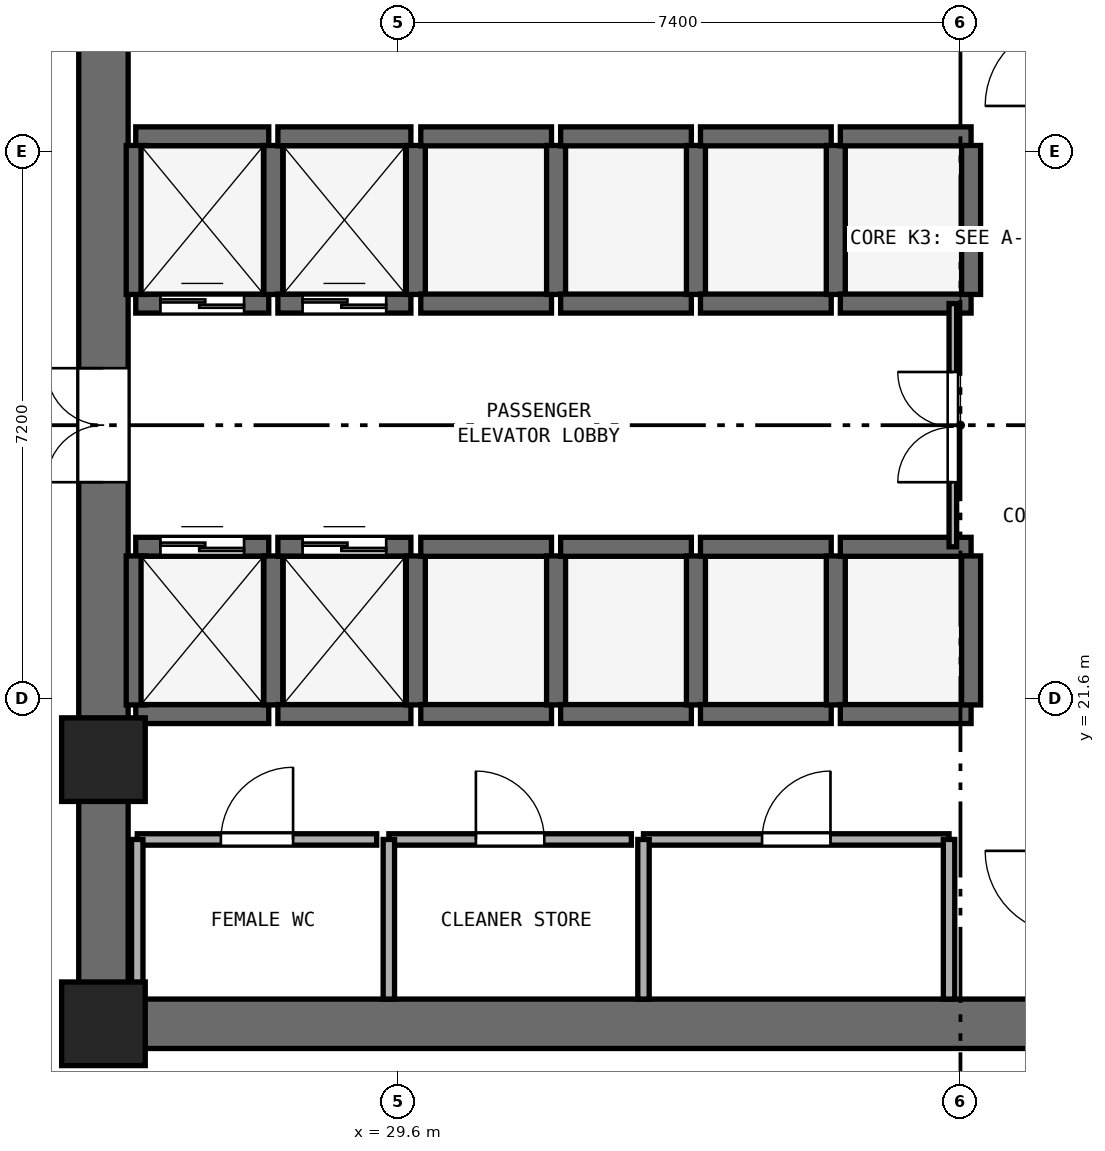
"""IFC4 building model, lengths in metres.
Left out: names, types, materials, properties, quantities, classifications, styles, units other than length and angle.
Written with IfcOpenShell. Run it as: python <this file> out.ifc"""

import sys

from ifc_helpers import new_model, si_unit, direction, frame, frame_2d, origin, origin_2d, place, context, subcontext, project, spatial, rectangle, extrude, element, fill, save


model = new_model("IFC4")
c1 = context("Model", 3, precision=1e-05, world=origin(), true_north=direction((0.0, 1.0)))
c2 = subcontext(c1, "Body", "Model", "MODEL_VIEW")
j1 = project(units=[si_unit("LENGTHUNIT", "METRE"), si_unit("PLANEANGLEUNIT", "RADIAN")], contexts=[c1])
p1 = place(None, origin())
s1 = spatial("IfcSite", under=j1, at=p1, CompositionType="ELEMENT")
p2 = place(p1, origin())
s2 = spatial("IfcBuilding", under=s1, at=p2, CompositionType="ELEMENT")
p3 = place(p2, frame((0.0, 0.0, 101.0)))
s3 = spatial("IfcBuildingStorey", under=s2, at=p3, CompositionType="ELEMENT", Elevation=101.0)
p4 = place(p3, frame((25.4, 17.325, 0.0), z_axis=(0.0, 0.0, 1.0), x_axis=(1.0, 0.0, 0.0)))
e1 = element("IfcWall", 1, at=p4, inside=s3, PredefinedType="SHEAR", context=c2, shape_type="SweptSolid", body=[
    extrude(rectangle(XDim=23.2, YDim=0.65, at=frame_2d((11.6, 0.0))), origin(), (0.0, 0.0, 1.0), 3.525),
])
p5 = place(p3, frame((25.725, 17.65, 0.0), z_axis=(0.0, 0.0, 1.0), x_axis=(0.0, 1.0, 0.0)))
e2 = element("IfcWall", 2, at=p5, inside=s3, PredefinedType="SHEAR", context=c2, shape_type="SweptSolid", body=[
    extrude(rectangle(XDim=15.1, YDim=0.65, at=frame_2d((7.55, 0.0))), origin(), (0.0, 0.0, 1.0), 3.525),
])
p6 = place(p5, frame((6.8, 0.0, 0.0)))
e3 = element("IfcOpeningElement", 3, at=p6, cuts=e2, PredefinedType="OPENING", context=c2, shape_type="SweptSolid", body=[
    extrude(rectangle(XDim=1.5, YDim=2.15, at=frame_2d((0.75, 1.075))), frame((0.0, 0.335, 0.0), z_axis=(0.0, -1.0, 0.0), x_axis=(1.0, 0.0, 0.0)), (0.0, 0.0, 1.0), 0.67),
])
for number, where, z_axis, x_axis in (
    (4, (25.725, 17.325, 0.0), (0.0, 0.0, 1.0), (1.0, 0.0, 0.0)),
    (5, (25.725, 20.8, 0.0), (0.0, 0.0, 1.0), (1.0, 0.0, 0.0)),
):
    element("IfcColumn", number, at=place(p3, frame(where, z_axis=z_axis, x_axis=x_axis)), inside=s3, PredefinedType="PILASTER", context=c2, shape_type="SweptSolid", body=[
        extrude(rectangle(XDim=1.1, YDim=1.1, at=origin_2d()), origin(), (0.0, 0.0, 1.0), 3.8),
    ])
p7 = place(p3, frame((26.15, 26.8, 0.0), z_axis=(0.0, 0.0, 1.0), x_axis=(1.0, 0.0, 0.0)))
e6 = element("IfcWall", 6, at=p7, inside=s3, PredefinedType="SHEAR", context=c2, shape_type="SweptSolid", body=[
    extrude(rectangle(XDim=1.75, YDim=0.25, at=frame_2d((0.875, 0.0))), origin(), (0.0, 0.0, 1.0), 3.525),
])
p8 = place(p7, frame((0.325, 0.0, 0.0)))
e7 = element("IfcOpeningElement", 7, at=p8, cuts=e6, PredefinedType="OPENING", context=c2, shape_type="SweptSolid", body=[
    extrude(rectangle(XDim=1.1, YDim=2.15, at=frame_2d((0.55, 1.075))), frame((0.0, 0.135, 0.0), z_axis=(0.0, -1.0, 0.0), x_axis=(1.0, 0.0, 0.0)), (0.0, 0.0, 1.0), 0.27),
])
p9 = place(p3, frame((26.15, 29.0, 0.0), z_axis=(0.0, 0.0, 1.0), x_axis=(1.0, 0.0, 0.0)))
e8 = element("IfcWall", 8, at=p9, inside=s3, PredefinedType="SHEAR", context=c2, shape_type="SweptSolid", body=[
    extrude(rectangle(XDim=1.75, YDim=0.25, at=frame_2d((0.875, 0.0))), origin(), (0.0, 0.0, 1.0), 3.525),
])
for number, where, z_axis, x_axis in (
    (9, (26.15, 26.92, 0.0), (0.0, 0.0, 1.0), (0.0, 1.0, 0.0)),
    (10, (27.96, 26.92, 0.0), (0.0, 0.0, 1.0), (0.0, 1.0, 0.0)),
):
    element("IfcWall", number, at=place(p3, frame(where, z_axis=z_axis, x_axis=x_axis)), inside=s3, PredefinedType="SHEAR", context=c2, shape_type="SweptSolid", body=[
        extrude(rectangle(XDim=1.96, YDim=0.25, at=frame_2d((0.98, 0.0))), origin(), (0.0, 0.0, 1.0), 3.525),
    ])
p10 = place(p3, frame((28.02, 26.8, 0.0), z_axis=(0.0, 0.0, 1.0), x_axis=(1.0, 0.0, 0.0)))
e11 = element("IfcWall", 11, at=p10, inside=s3, PredefinedType="SHEAR", context=c2, shape_type="SweptSolid", body=[
    extrude(rectangle(XDim=1.75, YDim=0.25, at=frame_2d((0.875, 0.0))), origin(), (0.0, 0.0, 1.0), 3.525),
])
p11 = place(p10, frame((0.325, 0.0, 0.0)))
e12 = element("IfcOpeningElement", 12, at=p11, cuts=e11, PredefinedType="OPENING", context=c2, shape_type="SweptSolid", body=[
    extrude(rectangle(XDim=1.1, YDim=2.15, at=frame_2d((0.55, 1.075))), frame((0.0, 0.135, 0.0), z_axis=(0.0, -1.0, 0.0), x_axis=(1.0, 0.0, 0.0)), (0.0, 0.0, 1.0), 0.27),
])
p12 = place(p3, frame((28.02, 29.0, 0.0), z_axis=(0.0, 0.0, 1.0), x_axis=(1.0, 0.0, 0.0)))
e13 = element("IfcWall", 13, at=p12, inside=s3, PredefinedType="SHEAR", context=c2, shape_type="SweptSolid", body=[
    extrude(rectangle(XDim=1.75, YDim=0.25, at=frame_2d((0.875, 0.0))), origin(), (0.0, 0.0, 1.0), 3.525),
])
p13 = place(p3, frame((29.835, 26.92, 0.0), z_axis=(0.0, 0.0, 1.0), x_axis=(0.0, 1.0, 0.0)))
e14 = element("IfcWall", 14, at=p13, inside=s3, PredefinedType="SHEAR", context=c2, shape_type="SweptSolid", body=[
    extrude(rectangle(XDim=1.96, YDim=0.25, at=frame_2d((0.98, 0.0))), origin(), (0.0, 0.0, 1.0), 3.525),
])
p14 = place(p3, frame((26.15, 21.4, 0.0), z_axis=(0.0, 0.0, 1.0), x_axis=(1.0, 0.0, 0.0)))
e15 = element("IfcWall", 15, at=p14, inside=s3, PredefinedType="SHEAR", context=c2, shape_type="SweptSolid", body=[
    extrude(rectangle(XDim=1.75, YDim=0.25, at=frame_2d((0.875, 0.0))), origin(), (0.0, 0.0, 1.0), 3.525),
])
p15 = place(p3, frame((26.15, 23.6, 0.0), z_axis=(0.0, 0.0, 1.0), x_axis=(1.0, 0.0, 0.0)))
e16 = element("IfcWall", 16, at=p15, inside=s3, PredefinedType="SHEAR", context=c2, shape_type="SweptSolid", body=[
    extrude(rectangle(XDim=1.75, YDim=0.25, at=frame_2d((0.875, 0.0))), origin(), (0.0, 0.0, 1.0), 3.525),
])
p16 = place(p15, frame((0.325, 0.0, 0.0)))
e17 = element("IfcOpeningElement", 17, at=p16, cuts=e16, PredefinedType="OPENING", context=c2, shape_type="SweptSolid", body=[
    extrude(rectangle(XDim=1.1, YDim=2.15, at=frame_2d((0.55, 1.075))), frame((0.0, 0.135, 0.0), z_axis=(0.0, -1.0, 0.0), x_axis=(1.0, 0.0, 0.0)), (0.0, 0.0, 1.0), 0.27),
])
for number, where, z_axis, x_axis in (
    (18, (26.15, 21.52, 0.0), (0.0, 0.0, 1.0), (0.0, 1.0, 0.0)),
    (19, (27.96, 21.52, 0.0), (0.0, 0.0, 1.0), (0.0, 1.0, 0.0)),
):
    element("IfcWall", number, at=place(p3, frame(where, z_axis=z_axis, x_axis=x_axis)), inside=s3, PredefinedType="SHEAR", context=c2, shape_type="SweptSolid", body=[
        extrude(rectangle(XDim=1.96, YDim=0.25, at=frame_2d((0.98, 0.0))), origin(), (0.0, 0.0, 1.0), 3.525),
    ])
p17 = place(p3, frame((28.02, 21.4, 0.0), z_axis=(0.0, 0.0, 1.0), x_axis=(1.0, 0.0, 0.0)))
e20 = element("IfcWall", 20, at=p17, inside=s3, PredefinedType="SHEAR", context=c2, shape_type="SweptSolid", body=[
    extrude(rectangle(XDim=1.75, YDim=0.25, at=frame_2d((0.875, 0.0))), origin(), (0.0, 0.0, 1.0), 3.525),
])
p18 = place(p3, frame((28.02, 23.6, 0.0), z_axis=(0.0, 0.0, 1.0), x_axis=(1.0, 0.0, 0.0)))
e21 = element("IfcWall", 21, at=p18, inside=s3, PredefinedType="SHEAR", context=c2, shape_type="SweptSolid", body=[
    extrude(rectangle(XDim=1.75, YDim=0.25, at=frame_2d((0.875, 0.0))), origin(), (0.0, 0.0, 1.0), 3.525),
])
p19 = place(p18, frame((0.325, 0.0, 0.0)))
e22 = element("IfcOpeningElement", 22, at=p19, cuts=e21, PredefinedType="OPENING", context=c2, shape_type="SweptSolid", body=[
    extrude(rectangle(XDim=1.1, YDim=2.15, at=frame_2d((0.55, 1.075))), frame((0.0, 0.135, 0.0), z_axis=(0.0, -1.0, 0.0), x_axis=(1.0, 0.0, 0.0)), (0.0, 0.0, 1.0), 0.27),
])
p20 = place(p3, frame((29.835, 21.52, 0.0), z_axis=(0.0, 0.0, 1.0), x_axis=(0.0, 1.0, 0.0)))
e23 = element("IfcWall", 23, at=p20, inside=s3, PredefinedType="SHEAR", context=c2, shape_type="SweptSolid", body=[
    extrude(rectangle(XDim=1.96, YDim=0.25, at=frame_2d((0.98, 0.0))), origin(), (0.0, 0.0, 1.0), 3.525),
])
for number, where, z_axis, x_axis in (
    (24, (29.9, 21.4, 0.0), (0.0, 0.0, 1.0), (1.0, 0.0, 0.0)),
    (25, (29.9, 23.6, 0.0), (0.0, 0.0, 1.0), (1.0, 0.0, 0.0)),
):
    element("IfcWall", number, at=place(p3, frame(where, z_axis=z_axis, x_axis=x_axis)), inside=s3, PredefinedType="SHEAR", context=c2, shape_type="SweptSolid", body=[
        extrude(rectangle(XDim=1.72, YDim=0.25, at=frame_2d((0.86, 0.0))), origin(), (0.0, 0.0, 1.0), 3.525),
    ])
p21 = place(p3, frame((31.68, 21.52, 0.0), z_axis=(0.0, 0.0, 1.0), x_axis=(0.0, 1.0, 0.0)))
e26 = element("IfcWall", 26, at=p21, inside=s3, PredefinedType="SHEAR", context=c2, shape_type="SweptSolid", body=[
    extrude(rectangle(XDim=1.96, YDim=0.25, at=frame_2d((0.98, 0.0))), origin(), (0.0, 0.0, 1.0), 3.525),
])
for number, where, z_axis, x_axis in (
    (27, (31.74, 21.4, 0.0), (0.0, 0.0, 1.0), (1.0, 0.0, 0.0)),
    (28, (31.74, 23.6, 0.0), (0.0, 0.0, 1.0), (1.0, 0.0, 0.0)),
):
    element("IfcWall", number, at=place(p3, frame(where, z_axis=z_axis, x_axis=x_axis)), inside=s3, PredefinedType="SHEAR", context=c2, shape_type="SweptSolid", body=[
        extrude(rectangle(XDim=1.72, YDim=0.25, at=frame_2d((0.86, 0.0))), origin(), (0.0, 0.0, 1.0), 3.525),
    ])
p22 = place(p3, frame((33.52, 21.52, 0.0), z_axis=(0.0, 0.0, 1.0), x_axis=(0.0, 1.0, 0.0)))
e29 = element("IfcWall", 29, at=p22, inside=s3, PredefinedType="SHEAR", context=c2, shape_type="SweptSolid", body=[
    extrude(rectangle(XDim=1.96, YDim=0.25, at=frame_2d((0.98, 0.0))), origin(), (0.0, 0.0, 1.0), 3.525),
])
for number, where, z_axis, x_axis in (
    (30, (33.58, 21.4, 0.0), (0.0, 0.0, 1.0), (1.0, 0.0, 0.0)),
    (31, (33.58, 23.6, 0.0), (0.0, 0.0, 1.0), (1.0, 0.0, 0.0)),
):
    element("IfcWall", number, at=place(p3, frame(where, z_axis=z_axis, x_axis=x_axis)), inside=s3, PredefinedType="SHEAR", context=c2, shape_type="SweptSolid", body=[
        extrude(rectangle(XDim=1.72, YDim=0.25, at=frame_2d((0.86, 0.0))), origin(), (0.0, 0.0, 1.0), 3.525),
    ])
p23 = place(p3, frame((35.36, 21.52, 0.0), z_axis=(0.0, 0.0, 1.0), x_axis=(0.0, 1.0, 0.0)))
e32 = element("IfcWall", 32, at=p23, inside=s3, PredefinedType="SHEAR", context=c2, shape_type="SweptSolid", body=[
    extrude(rectangle(XDim=1.96, YDim=0.25, at=frame_2d((0.98, 0.0))), origin(), (0.0, 0.0, 1.0), 3.525),
])
for number, where, z_axis, x_axis in (
    (33, (35.42, 21.4, 0.0), (0.0, 0.0, 1.0), (1.0, 0.0, 0.0)),
    (34, (35.42, 23.6, 0.0), (0.0, 0.0, 1.0), (1.0, 0.0, 0.0)),
):
    element("IfcWall", number, at=place(p3, frame(where, z_axis=z_axis, x_axis=x_axis)), inside=s3, PredefinedType="SHEAR", context=c2, shape_type="SweptSolid", body=[
        extrude(rectangle(XDim=1.72, YDim=0.25, at=frame_2d((0.86, 0.0))), origin(), (0.0, 0.0, 1.0), 3.525),
    ])
p24 = place(p3, frame((37.14, 21.52, 0.0), z_axis=(0.0, 0.0, 1.0), x_axis=(0.0, 1.0, 0.0)))
e35 = element("IfcWall", 35, at=p24, inside=s3, PredefinedType="SHEAR", context=c2, shape_type="SweptSolid", body=[
    extrude(rectangle(XDim=1.96, YDim=0.25, at=frame_2d((0.98, 0.0))), origin(), (0.0, 0.0, 1.0), 3.525),
])
for number, where, z_axis, x_axis in (
    (36, (29.9, 26.8, 0.0), (0.0, 0.0, 1.0), (1.0, 0.0, 0.0)),
    (37, (29.9, 29.0, 0.0), (0.0, 0.0, 1.0), (1.0, 0.0, 0.0)),
):
    element("IfcWall", number, at=place(p3, frame(where, z_axis=z_axis, x_axis=x_axis)), inside=s3, PredefinedType="SHEAR", context=c2, shape_type="SweptSolid", body=[
        extrude(rectangle(XDim=1.72, YDim=0.25, at=frame_2d((0.86, 0.0))), origin(), (0.0, 0.0, 1.0), 3.525),
    ])
p25 = place(p3, frame((31.68, 26.92, 0.0), z_axis=(0.0, 0.0, 1.0), x_axis=(0.0, 1.0, 0.0)))
e38 = element("IfcWall", 38, at=p25, inside=s3, PredefinedType="SHEAR", context=c2, shape_type="SweptSolid", body=[
    extrude(rectangle(XDim=1.96, YDim=0.25, at=frame_2d((0.98, 0.0))), origin(), (0.0, 0.0, 1.0), 3.525),
])
for number, where, z_axis, x_axis in (
    (39, (31.74, 26.8, 0.0), (0.0, 0.0, 1.0), (1.0, 0.0, 0.0)),
    (40, (31.74, 29.0, 0.0), (0.0, 0.0, 1.0), (1.0, 0.0, 0.0)),
):
    element("IfcWall", number, at=place(p3, frame(where, z_axis=z_axis, x_axis=x_axis)), inside=s3, PredefinedType="SHEAR", context=c2, shape_type="SweptSolid", body=[
        extrude(rectangle(XDim=1.72, YDim=0.25, at=frame_2d((0.86, 0.0))), origin(), (0.0, 0.0, 1.0), 3.525),
    ])
p26 = place(p3, frame((33.52, 26.92, 0.0), z_axis=(0.0, 0.0, 1.0), x_axis=(0.0, 1.0, 0.0)))
e41 = element("IfcWall", 41, at=p26, inside=s3, PredefinedType="SHEAR", context=c2, shape_type="SweptSolid", body=[
    extrude(rectangle(XDim=1.96, YDim=0.25, at=frame_2d((0.98, 0.0))), origin(), (0.0, 0.0, 1.0), 3.525),
])
for number, where, z_axis, x_axis in (
    (42, (33.58, 26.8, 0.0), (0.0, 0.0, 1.0), (1.0, 0.0, 0.0)),
    (43, (33.58, 29.0, 0.0), (0.0, 0.0, 1.0), (1.0, 0.0, 0.0)),
):
    element("IfcWall", number, at=place(p3, frame(where, z_axis=z_axis, x_axis=x_axis)), inside=s3, PredefinedType="SHEAR", context=c2, shape_type="SweptSolid", body=[
        extrude(rectangle(XDim=1.72, YDim=0.25, at=frame_2d((0.86, 0.0))), origin(), (0.0, 0.0, 1.0), 3.525),
    ])
p27 = place(p3, frame((35.36, 26.92, 0.0), z_axis=(0.0, 0.0, 1.0), x_axis=(0.0, 1.0, 0.0)))
e44 = element("IfcWall", 44, at=p27, inside=s3, PredefinedType="SHEAR", context=c2, shape_type="SweptSolid", body=[
    extrude(rectangle(XDim=1.96, YDim=0.25, at=frame_2d((0.98, 0.0))), origin(), (0.0, 0.0, 1.0), 3.525),
])
for number, where, z_axis, x_axis in (
    (45, (35.42, 26.8, 0.0), (0.0, 0.0, 1.0), (1.0, 0.0, 0.0)),
    (46, (35.42, 29.0, 0.0), (0.0, 0.0, 1.0), (1.0, 0.0, 0.0)),
):
    element("IfcWall", number, at=place(p3, frame(where, z_axis=z_axis, x_axis=x_axis)), inside=s3, PredefinedType="SHEAR", context=c2, shape_type="SweptSolid", body=[
        extrude(rectangle(XDim=1.72, YDim=0.25, at=frame_2d((0.86, 0.0))), origin(), (0.0, 0.0, 1.0), 3.525),
    ])
p28 = place(p3, frame((37.14, 26.92, 0.0), z_axis=(0.0, 0.0, 1.0), x_axis=(0.0, 1.0, 0.0)))
e47 = element("IfcWall", 47, at=p28, inside=s3, PredefinedType="SHEAR", context=c2, shape_type="SweptSolid", body=[
    extrude(rectangle(XDim=1.96, YDim=0.25, at=frame_2d((0.98, 0.0))), origin(), (0.0, 0.0, 1.0), 3.525),
])
p29 = place(p3, frame((26.17, 19.75, 0.0), z_axis=(0.0, 0.0, 1.0), x_axis=(1.0, 0.0, 0.0)))
e48 = element("IfcWall", 48, at=p29, inside=s3, PredefinedType="PARTITIONING", context=c2, shape_type="SweptSolid", body=[
    extrude(rectangle(XDim=3.15, YDim=0.15, at=frame_2d((1.575, 0.0))), origin(), (0.0, 0.0, 1.0), 3.525),
])
p30 = place(p29, frame((1.1, 0.0, 0.0)))
e49 = element("IfcOpeningElement", 49, at=p30, cuts=e48, PredefinedType="OPENING", context=c2, shape_type="SweptSolid", body=[
    extrude(rectangle(XDim=0.95, YDim=2.1, at=frame_2d((0.475, 1.05))), frame((0.0, 0.085, 0.0), z_axis=(0.0, -1.0, 0.0), x_axis=(1.0, 0.0, 0.0)), (0.0, 0.0, 1.0), 0.17),
])
p31 = place(p3, frame((26.17, 17.65, 0.0), z_axis=(0.0, 0.0, 1.0), x_axis=(0.0, 1.0, 0.0)))
e50 = element("IfcWall", 50, at=p31, inside=s3, PredefinedType="PARTITIONING", context=c2, shape_type="SweptSolid", body=[
    extrude(rectangle(XDim=2.1, YDim=0.15, at=frame_2d((1.05, 0.0))), origin(), (0.0, 0.0, 1.0), 3.525),
])
p32 = place(p3, frame((29.48, 19.75, 0.0), z_axis=(0.0, 0.0, 1.0), x_axis=(1.0, 0.0, 0.0)))
e51 = element("IfcWall", 51, at=p32, inside=s3, PredefinedType="PARTITIONING", context=c2, shape_type="SweptSolid", body=[
    extrude(rectangle(XDim=3.19, YDim=0.15, at=frame_2d((1.595, 0.0))), origin(), (0.0, 0.0, 1.0), 3.525),
])
p33 = place(p32, frame((1.145, 0.0, 0.0)))
e52 = element("IfcOpeningElement", 52, at=p33, cuts=e51, PredefinedType="OPENING", context=c2, shape_type="SweptSolid", body=[
    extrude(rectangle(XDim=0.9, YDim=2.1, at=frame_2d((0.45, 1.05))), frame((0.0, 0.085, 0.0), z_axis=(0.0, -1.0, 0.0), x_axis=(1.0, 0.0, 0.0)), (0.0, 0.0, 1.0), 0.17),
])
p34 = place(p3, frame((29.48, 17.65, 0.0), z_axis=(0.0, 0.0, 1.0), x_axis=(0.0, 1.0, 0.0)))
e53 = element("IfcWall", 53, at=p34, inside=s3, PredefinedType="PARTITIONING", context=c2, shape_type="SweptSolid", body=[
    extrude(rectangle(XDim=2.1, YDim=0.15, at=frame_2d((1.05, 0.0))), origin(), (0.0, 0.0, 1.0), 3.525),
])
p35 = place(p3, frame((32.83, 19.75, 0.0), z_axis=(0.0, 0.0, 1.0), x_axis=(1.0, 0.0, 0.0)))
e54 = element("IfcWall", 54, at=p35, inside=s3, PredefinedType="PARTITIONING", context=c2, shape_type="SweptSolid", body=[
    extrude(rectangle(XDim=4.02, YDim=0.15, at=frame_2d((2.01, 0.0))), origin(), (0.0, 0.0, 1.0), 3.525),
])
p36 = place(p35, frame((1.56, 0.0, 0.0)))
e55 = element("IfcOpeningElement", 55, at=p36, cuts=e54, PredefinedType="OPENING", context=c2, shape_type="SweptSolid", body=[
    extrude(rectangle(XDim=0.9, YDim=2.1, at=frame_2d((0.45, 1.05))), frame((0.0, 0.085, 0.0), z_axis=(0.0, -1.0, 0.0), x_axis=(1.0, 0.0, 0.0)), (0.0, 0.0, 1.0), 0.17),
])
for number, where, z_axis, x_axis in (
    (56, (32.83, 17.65, 0.0), (0.0, 0.0, 1.0), (0.0, 1.0, 0.0)),
    (57, (36.85, 17.65, 0.0), (0.0, 0.0, 1.0), (0.0, 1.0, 0.0)),
):
    element("IfcWall", number, at=place(p3, frame(where, z_axis=z_axis, x_axis=x_axis)), inside=s3, PredefinedType="PARTITIONING", context=c2, shape_type="SweptSolid", body=[
        extrude(rectangle(XDim=2.1, YDim=0.15, at=frame_2d((1.05, 0.0))), origin(), (0.0, 0.0, 1.0), 3.525),
    ])
p37 = place(p3, frame((36.9, 23.6, 0.0), z_axis=(0.0, 0.0, 1.0), x_axis=(0.0, 1.0, 0.0)))
e58 = element("IfcWall", 58, at=p37, inside=s3, PredefinedType="PARTITIONING", context=c2, shape_type="SweptSolid", body=[
    extrude(rectangle(XDim=3.2, YDim=0.1, at=frame_2d((1.6, 0.0))), origin(), (0.0, 0.0, 1.0), 3.525),
])
p38 = place(p37, frame((0.85, 0.0, 0.0)))
e59 = element("IfcOpeningElement", 59, at=p38, cuts=e58, PredefinedType="OPENING", context=c2, shape_type="SweptSolid", body=[
    extrude(rectangle(XDim=1.45, YDim=2.12, at=frame_2d((0.725, 1.06))), frame((0.0, 0.06, 0.0), z_axis=(0.0, -1.0, 0.0), x_axis=(1.0, 0.0, 0.0)), (0.0, 0.0, 1.0), 0.12),
])
p39 = place(p8, origin())
e60 = element("IfcDoor", 60, at=p39, inside=s3, OperationType="DOUBLE_DOOR_SLIDING", PredefinedType="DOOR", context=c2, shape_type="SweptSolid", body=[
    extrude(rectangle(XDim=1.1, YDim=2.15, at=frame_2d((0.55, 1.075))), frame((0.0, 0.025, 0.0), z_axis=(0.0, -1.0, 0.0), x_axis=(1.0, 0.0, 0.0)), (0.0, 0.0, 1.0), 0.05),
])
fill(e7, e60)
p40 = place(p11, origin())
e61 = element("IfcDoor", 61, at=p40, inside=s3, OperationType="DOUBLE_DOOR_SLIDING", PredefinedType="DOOR", context=c2, shape_type="SweptSolid", body=[
    extrude(rectangle(XDim=1.1, YDim=2.15, at=frame_2d((0.55, 1.075))), frame((0.0, 0.025, 0.0), z_axis=(0.0, -1.0, 0.0), x_axis=(1.0, 0.0, 0.0)), (0.0, 0.0, 1.0), 0.05),
])
fill(e12, e61)
p41 = place(p16, origin())
e62 = element("IfcDoor", 62, at=p41, inside=s3, OperationType="DOUBLE_DOOR_SLIDING", PredefinedType="DOOR", context=c2, shape_type="SweptSolid", body=[
    extrude(rectangle(XDim=1.1, YDim=2.15, at=frame_2d((0.55, 1.075))), frame((0.0, 0.025, 0.0), z_axis=(0.0, -1.0, 0.0), x_axis=(1.0, 0.0, 0.0)), (0.0, 0.0, 1.0), 0.05),
])
fill(e17, e62)
p42 = place(p19, origin())
e63 = element("IfcDoor", 63, at=p42, inside=s3, OperationType="DOUBLE_DOOR_SLIDING", PredefinedType="DOOR", context=c2, shape_type="SweptSolid", body=[
    extrude(rectangle(XDim=1.1, YDim=2.15, at=frame_2d((0.55, 1.075))), frame((0.0, 0.025, 0.0), z_axis=(0.0, -1.0, 0.0), x_axis=(1.0, 0.0, 0.0)), (0.0, 0.0, 1.0), 0.05),
])
fill(e22, e63)
p43 = place(p6, origin())
e64 = element("IfcDoor", 64, at=p43, inside=s3, OperationType="DOUBLE_DOOR_SINGLE_SWING", PredefinedType="DOOR", context=c2, shape_type="SweptSolid", body=[
    extrude(rectangle(XDim=1.5, YDim=2.15, at=frame_2d((0.75, 1.075))), frame((0.0, 0.025, 0.0), z_axis=(0.0, -1.0, 0.0), x_axis=(1.0, 0.0, 0.0)), (0.0, 0.0, 1.0), 0.05),
])
fill(e3, e64)
p44 = place(p30, origin())
e65 = element("IfcDoor", 65, at=p44, inside=s3, OperationType="SINGLE_SWING_RIGHT", PredefinedType="DOOR", context=c2, shape_type="SweptSolid", body=[
    extrude(rectangle(XDim=0.95, YDim=2.1, at=frame_2d((0.475, 1.05))), frame((0.0, 0.025, 0.0), z_axis=(0.0, -1.0, 0.0), x_axis=(1.0, 0.0, 0.0)), (0.0, 0.0, 1.0), 0.05),
])
fill(e49, e65)
p45 = place(p33, origin())
e66 = element("IfcDoor", 66, at=p45, inside=s3, OperationType="SINGLE_SWING_LEFT", PredefinedType="DOOR", context=c2, shape_type="SweptSolid", body=[
    extrude(rectangle(XDim=0.9, YDim=2.1, at=frame_2d((0.45, 1.05))), frame((0.0, 0.025, 0.0), z_axis=(0.0, -1.0, 0.0), x_axis=(1.0, 0.0, 0.0)), (0.0, 0.0, 1.0), 0.05),
])
fill(e52, e66)
p46 = place(p36, origin())
e67 = element("IfcDoor", 67, at=p46, inside=s3, OperationType="SINGLE_SWING_RIGHT", PredefinedType="DOOR", context=c2, shape_type="SweptSolid", body=[
    extrude(rectangle(XDim=0.9, YDim=2.1, at=frame_2d((0.45, 1.05))), frame((0.0, 0.025, 0.0), z_axis=(0.0, -1.0, 0.0), x_axis=(1.0, 0.0, 0.0)), (0.0, 0.0, 1.0), 0.05),
])
fill(e55, e67)
p47 = place(p38, origin())
e68 = element("IfcDoor", 68, at=p47, inside=s3, OperationType="DOUBLE_DOOR_SINGLE_SWING", PredefinedType="DOOR", context=c2, shape_type="SweptSolid", body=[
    extrude(rectangle(XDim=1.45, YDim=2.12, at=frame_2d((0.725, 1.06))), frame((0.0, 0.025, 0.0), z_axis=(0.0, -1.0, 0.0), x_axis=(1.0, 0.0, 0.0)), (0.0, 0.0, 1.0), 0.05),
])
fill(e59, e68)
save(model, sys.argv[1])
